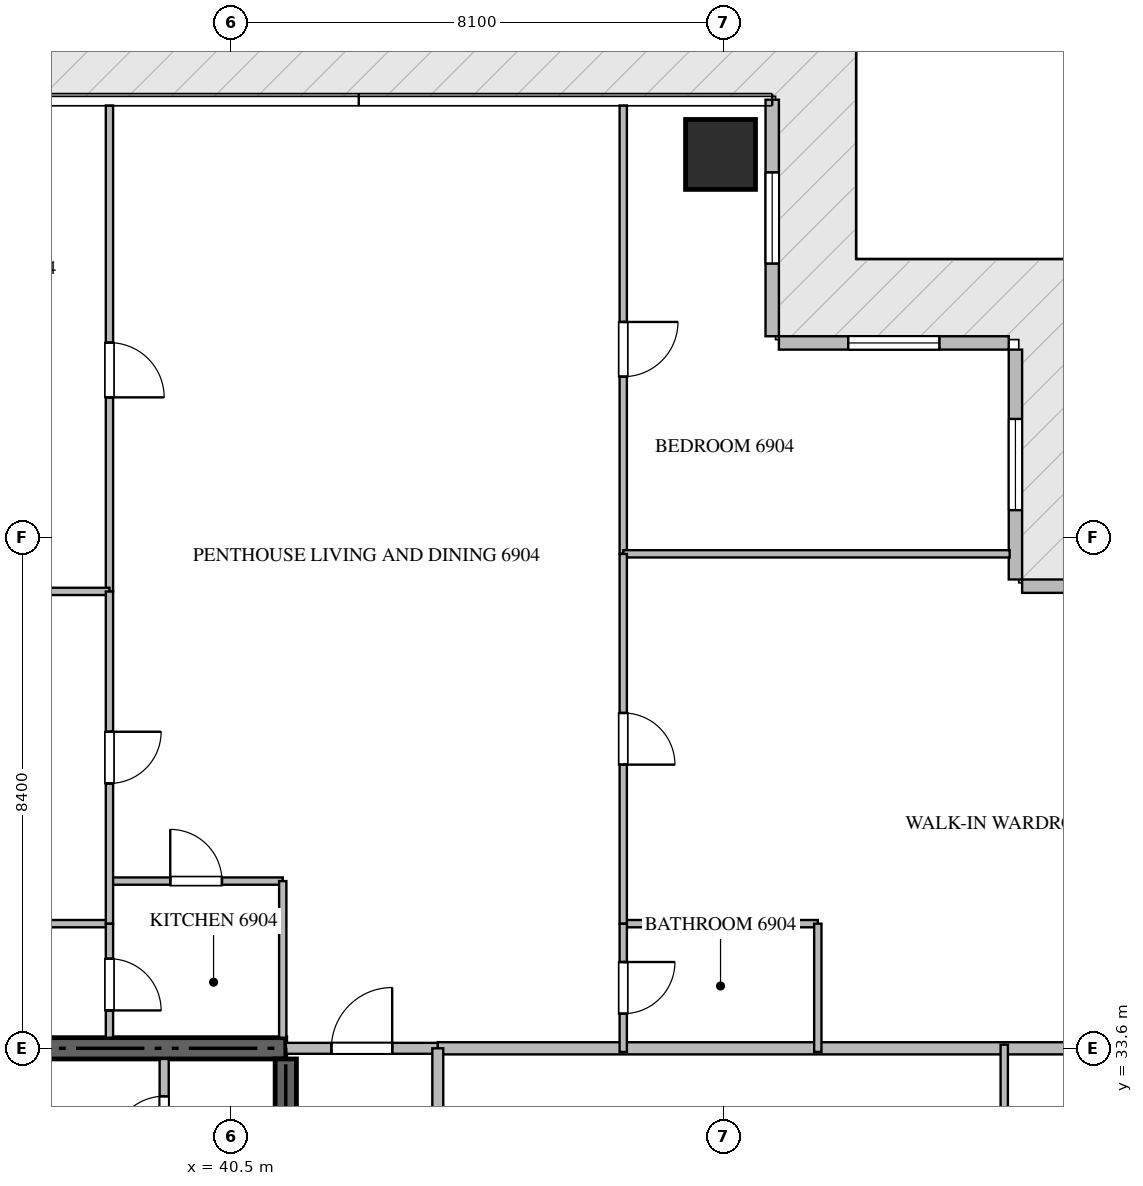
"""IFC4 building model, lengths in metres.
Left out: names, types, materials, properties, quantities, classifications, styles, units other than length and angle.
Written with IfcOpenShell. Run it as: python <this file> out.ifc"""

import sys

from ifc_helpers import new_model, si_unit, direction, frame, frame_2d, origin, origin_2d, place, context, subcontext, project, spatial, rectangle, extrude, source, transform, mapped, element, fill, save


model = new_model("IFC4")
c1 = context("Model", 3, precision=1e-05, world=origin(), true_north=direction((0.0, 1.0)))
c2 = subcontext(c1, "Body", "Model", "MODEL_VIEW")
j1 = project(units=[si_unit("LENGTHUNIT", "METRE"), si_unit("PLANEANGLEUNIT", "RADIAN")], contexts=[c1])
p1 = place(None, origin())
s1 = spatial("IfcSite", under=j1, at=p1, CompositionType="ELEMENT")
p2 = place(p1, origin())
s2 = spatial("IfcBuilding", under=s1, at=p2, CompositionType="ELEMENT")
p3 = place(p2, frame((0.0, 0.0, 275.9)))
s3 = spatial("IfcBuildingStorey", under=s2, at=p3, CompositionType="ELEMENT", Elevation=275.9)
p4 = place(p3, frame((41.4, 33.6, -0.26), z_axis=(0.0, 0.0, 1.0), x_axis=(-1.0, 0.0, 0.0)))
e1 = element("IfcWall", 1, at=p4, inside=s3, PredefinedType="SHEAR", context=c2, shape_type="SweptSolid", body=[
    extrude(rectangle(XDim=18.0, YDim=0.35, at=frame_2d((9.0, 0.0))), origin(), (0.0, 0.0, 1.0), 3.848),
])
p5 = place(p3, frame((41.4, 27.75, -0.26), z_axis=(0.0, 0.0, 1.0), x_axis=(0.0, 1.0, 0.0)))
e2 = element("IfcWall", 2, at=p5, inside=s3, PredefinedType="SHEAR", context=c2, shape_type="SweptSolid", body=[
    extrude(rectangle(XDim=5.675, YDim=0.35, at=frame_2d((2.837, 0.0))), origin(), (0.0, 0.0, 1.0), 3.848),
])
m1 = source(origin(), c2, "Body", "SweptSolid", [
    extrude(rectangle(XDim=1.15, YDim=1.15, at=origin_2d()), origin(), (0.0, 0.0, 1.0), 3.85),
])
p6 = place(p3, frame((48.55, 48.3, -0.26), z_axis=(0.0, 0.0, 1.0), x_axis=(1.0, 0.0, 0.0)))
e3 = element("IfcColumn", 3, at=p6, inside=s3, PredefinedType="COLUMN", context=c2, shape_type="MappedRepresentation", body=[
    mapped(m1, transform((0.0, 0.0, 0.0), scale=1.0)),
])
p7 = place(p3, frame((57.4, 41.2, 0.0), z_axis=(0.0, 0.0, 1.0), x_axis=(-1.0, 0.0, 0.0)))
e4 = element("IfcWall", 4, at=p7, inside=s3, PredefinedType="ELEMENTEDWALL", context=c2, shape_type="SweptSolid", body=[
    extrude(rectangle(XDim=3.89, YDim=0.22, at=frame_2d((1.945, 0.0))), origin(), (0.0, 0.0, 1.0), 3.575),
])
p8 = place(p7, frame((1.195, 0.0, 0.65)))
e5 = element("IfcOpeningElement", 5, at=p8, cuts=e4, PredefinedType="OPENING", context=c2, shape_type="SweptSolid", body=[
    extrude(rectangle(XDim=1.5, YDim=2.25, at=frame_2d((0.75, 1.125))), frame((0.0, 0.12, 0.0), z_axis=(0.0, -1.0, 0.0), x_axis=(1.0, 0.0, 0.0)), (0.0, 0.0, 1.0), 0.24),
])
p9 = place(p3, frame((53.4, 41.31, 0.0), z_axis=(0.0, 0.0, 1.0), x_axis=(0.0, 1.0, 0.0)))
e6 = element("IfcWall", 6, at=p9, inside=s3, PredefinedType="ELEMENTEDWALL", context=c2, shape_type="SweptSolid", body=[
    extrude(rectangle(XDim=3.78, YDim=0.22, at=frame_2d((1.89, 0.0))), origin(), (0.0, 0.0, 1.0), 3.575),
])
p10 = place(p9, frame((1.14, 0.0, 0.65)))
e7 = element("IfcOpeningElement", 7, at=p10, cuts=e6, PredefinedType="OPENING", context=c2, shape_type="SweptSolid", body=[
    extrude(rectangle(XDim=1.5, YDim=2.25, at=frame_2d((0.75, 1.125))), frame((0.0, 0.12, 0.0), z_axis=(0.0, -1.0, 0.0), x_axis=(1.0, 0.0, 0.0)), (0.0, 0.0, 1.0), 0.24),
])
p11 = place(p3, frame((53.29, 45.2, 0.0), z_axis=(0.0, 0.0, 1.0), x_axis=(-1.0, 0.0, 0.0)))
e8 = element("IfcWall", 8, at=p11, inside=s3, PredefinedType="ELEMENTEDWALL", context=c2, shape_type="SweptSolid", body=[
    extrude(rectangle(XDim=3.78, YDim=0.22, at=frame_2d((1.89, 0.0))), origin(), (0.0, 0.0, 1.0), 3.575),
])
p12 = place(p11, frame((1.14, 0.0, 0.65)))
e9 = element("IfcOpeningElement", 9, at=p12, cuts=e8, PredefinedType="OPENING", context=c2, shape_type="SweptSolid", body=[
    extrude(rectangle(XDim=1.5, YDim=2.25, at=frame_2d((0.75, 1.125))), frame((0.0, 0.12, 0.0), z_axis=(0.0, -1.0, 0.0), x_axis=(1.0, 0.0, 0.0)), (0.0, 0.0, 1.0), 0.24),
])
p13 = place(p3, frame((49.4, 45.31, 0.0), z_axis=(0.0, 0.0, 1.0), x_axis=(0.0, 1.0, 0.0)))
e10 = element("IfcWall", 10, at=p13, inside=s3, PredefinedType="ELEMENTEDWALL", context=c2, shape_type="SweptSolid", body=[
    extrude(rectangle(XDim=3.89, YDim=0.22, at=frame_2d((1.945, 0.0))), origin(), (0.0, 0.0, 1.0), 3.575),
])
p14 = place(p13, frame((1.195, 0.0, 0.65)))
e11 = element("IfcOpeningElement", 11, at=p14, cuts=e10, PredefinedType="OPENING", context=c2, shape_type="SweptSolid", body=[
    extrude(rectangle(XDim=1.5, YDim=2.25, at=frame_2d((0.75, 1.125))), frame((0.0, 0.12, 0.0), z_axis=(0.0, -1.0, 0.0), x_axis=(1.0, 0.0, 0.0)), (0.0, 0.0, 1.0), 0.24),
])
p15 = place(p3, frame((39.4, 31.35, 0.0), z_axis=(0.0, 0.0, 1.0), x_axis=(0.0, 1.0, 0.0)))
e12 = element("IfcWall", 12, at=p15, inside=s3, PredefinedType="PARTITIONING", context=c2, shape_type="SweptSolid", body=[
    extrude(rectangle(XDim=2.075, YDim=0.15, at=frame_2d((1.038, 0.0))), origin(), (0.0, 0.0, 1.0), 3.59),
])
p16 = place(p15, frame((0.612, 0.0, 0.0)))
e13 = element("IfcOpeningElement", 13, at=p16, cuts=e12, PredefinedType="OPENING", context=c2, shape_type="SweptSolid", body=[
    extrude(rectangle(XDim=0.85, YDim=2.1, at=frame_2d((0.425, 1.05))), frame((0.0, 0.085, 0.0), z_axis=(0.0, -1.0, 0.0), x_axis=(1.0, 0.0, 0.0)), (0.0, 0.0, 1.0), 0.17),
])
p17 = place(p3, frame((43.9, 33.6, 0.0), z_axis=(0.0, 0.0, 1.0), x_axis=(1.0, 0.0, 0.0)))
e14 = element("IfcWall", 14, at=p17, inside=s3, PredefinedType="PARTITIONING", context=c2, shape_type="SweptSolid", body=[
    extrude(rectangle(XDim=13.418, YDim=0.2, at=frame_2d((6.709, 0.0))), origin(), (0.0, 0.0, 1.0), 3.59),
])
p18 = place(p3, frame((41.402, 33.6, 0.0), z_axis=(0.0, 0.0, 1.0), x_axis=(1.0, 0.0, 0.0)))
e15 = element("IfcWall", 15, at=p18, inside=s3, PredefinedType="PARTITIONING", context=c2, shape_type="SweptSolid", body=[
    extrude(rectangle(XDim=2.496, YDim=0.18, at=frame_2d((1.248, 0.0))), origin(), (0.0, 0.0, 1.0), 3.59),
])
p19 = place(p18, frame((0.748, 0.0, 0.0)))
e16 = element("IfcOpeningElement", 16, at=p19, cuts=e15, PredefinedType="OPENING", context=c2, shape_type="SweptSolid", body=[
    extrude(rectangle(XDim=1.0, YDim=2.15, at=frame_2d((0.5, 1.075))), frame((0.0, 0.1, 0.0), z_axis=(0.0, -1.0, 0.0), x_axis=(1.0, 0.0, 0.0)), (0.0, 0.0, 1.0), 0.2),
])
p20 = place(p3, frame((43.9, 16.8, 0.0), z_axis=(0.0, 0.0, 1.0), x_axis=(0.0, 1.0, 0.0)))
e17 = element("IfcWall", 17, at=p20, inside=s3, PredefinedType="PARTITIONING", context=c2, shape_type="SweptSolid", body=[
    extrude(rectangle(XDim=16.8, YDim=0.18, at=frame_2d((8.4, 0.0))), origin(), (0.0, 0.0, 1.0), 3.59),
])
p21 = place(p20, frame((1.3, 0.0, 0.0)))
e18 = element("IfcOpeningElement", 18, at=p21, cuts=e17, PredefinedType="OPENING", context=c2, shape_type="SweptSolid", body=[
    extrude(rectangle(XDim=1.0, YDim=2.15, at=frame_2d((0.5, 1.075))), frame((0.0, 0.1, 0.0), z_axis=(0.0, -1.0, 0.0), x_axis=(1.0, 0.0, 0.0)), (0.0, 0.0, 1.0), 0.2),
])
p22 = place(p3, frame((38.5, 36.35, 0.0), z_axis=(0.0, 0.0, 1.0), x_axis=(1.0, 0.0, 0.0)))
e19 = element("IfcWall", 19, at=p22, inside=s3, PredefinedType="PARTITIONING", context=c2, shape_type="SweptSolid", body=[
    extrude(rectangle(XDim=2.85, YDim=0.12, at=frame_2d((1.425, 0.0))), origin(), (0.0, 0.0, 1.0), 3.59),
])
p23 = place(p22, frame((1.0, 0.0, 0.0)))
e20 = element("IfcOpeningElement", 20, at=p23, cuts=e19, PredefinedType="OPENING", context=c2, shape_type="SweptSolid", body=[
    extrude(rectangle(XDim=0.85, YDim=2.1, at=frame_2d((0.425, 1.05))), frame((0.0, 0.07, 0.0), z_axis=(0.0, -1.0, 0.0), x_axis=(1.0, 0.0, 0.0)), (0.0, 0.0, 1.0), 0.14),
])
p24 = place(p3, frame((41.35, 36.35, 0.0), z_axis=(0.0, 0.0, 1.0), x_axis=(0.0, -1.0, 0.0)))
e21 = element("IfcWall", 21, at=p24, inside=s3, PredefinedType="PARTITIONING", context=c2, shape_type="SweptSolid", body=[
    extrude(rectangle(XDim=2.575, YDim=0.12, at=frame_2d((1.288, 0.0))), origin(), (0.0, 0.0, 1.0), 3.59),
])
p25 = place(p3, frame((38.5, 49.105, 0.0), z_axis=(0.0, 0.0, 1.0), x_axis=(0.0, -1.0, 0.0)))
e22 = element("IfcWall", 22, at=p25, inside=s3, PredefinedType="PARTITIONING", context=c2, shape_type="SweptSolid", body=[
    extrude(rectangle(XDim=7.991, YDim=0.12, at=frame_2d((3.996, 0.0))), origin(), (0.0, 0.0, 1.0), 3.59),
])
p26 = place(p25, frame((3.9, 0.0, 0.0)))
e23 = element("IfcOpeningElement", 23, at=p26, cuts=e22, PredefinedType="OPENING", context=c2, shape_type="SweptSolid", body=[
    extrude(rectangle(XDim=0.9, YDim=2.1, at=frame_2d((0.45, 1.05))), frame((0.0, 0.07, 0.0), z_axis=(0.0, -1.0, 0.0), x_axis=(1.0, 0.0, 0.0)), (0.0, 0.0, 1.0), 0.14),
])
p27 = place(p3, frame((33.14, 41.114, 0.0), z_axis=(0.0, 0.0, 1.0), x_axis=(1.0, 0.0, 0.0)))
e24 = element("IfcWall", 24, at=p27, inside=s3, PredefinedType="PARTITIONING", context=c2, shape_type="SweptSolid", body=[
    extrude(rectangle(XDim=5.36, YDim=0.12, at=frame_2d((2.68, 0.0))), origin(), (0.0, 0.0, 1.0), 3.59),
])
p28 = place(p3, frame((33.262, 35.65, 0.0), z_axis=(0.0, 0.0, 1.0), x_axis=(1.0, 0.0, 0.0)))
e25 = element("IfcWall", 25, at=p28, inside=s3, PredefinedType="PARTITIONING", context=c2, shape_type="SweptSolid", body=[
    extrude(rectangle(XDim=5.238, YDim=0.12, at=frame_2d((2.619, 0.0))), origin(), (0.0, 0.0, 1.0), 3.59),
])
p29 = place(p3, frame((38.5, 41.112, 0.0), z_axis=(0.0, 0.0, 1.0), x_axis=(0.0, -1.0, 0.0)))
e26 = element("IfcWall", 26, at=p29, inside=s3, PredefinedType="PARTITIONING", context=c2, shape_type="SweptSolid", body=[
    extrude(rectangle(XDim=5.462, YDim=0.12, at=frame_2d((2.731, 0.0))), origin(), (0.0, 0.0, 1.0), 3.59),
])
p30 = place(p29, frame((2.306, 0.0, 0.0)))
e27 = element("IfcOpeningElement", 27, at=p30, cuts=e26, PredefinedType="OPENING", context=c2, shape_type="SweptSolid", body=[
    extrude(rectangle(XDim=0.85, YDim=2.1, at=frame_2d((0.425, 1.05))), frame((0.0, 0.07, 0.0), z_axis=(0.0, -1.0, 0.0), x_axis=(1.0, 0.0, 0.0)), (0.0, 0.0, 1.0), 0.14),
])
p31 = place(p3, frame((38.5, 35.648, 0.0), z_axis=(0.0, 0.0, 1.0), x_axis=(0.0, -1.0, 0.0)))
e28 = element("IfcWall", 28, at=p31, inside=s3, PredefinedType="PARTITIONING", context=c2, shape_type="SweptSolid", body=[
    extrude(rectangle(XDim=1.873, YDim=0.12, at=frame_2d((0.937, 0.0))), origin(), (0.0, 0.0, 1.0), 3.59),
])
p32 = place(p31, frame((0.575, 0.0, 0.0)))
e29 = element("IfcOpeningElement", 29, at=p32, cuts=e28, PredefinedType="OPENING", context=c2, shape_type="SweptSolid", body=[
    extrude(rectangle(XDim=0.85, YDim=2.1, at=frame_2d((0.425, 1.05))), frame((0.0, 0.07, 0.0), z_axis=(0.0, -1.0, 0.0), x_axis=(1.0, 0.0, 0.0)), (0.0, 0.0, 1.0), 0.14),
])
p33 = place(p3, frame((46.95, 49.105, 0.0), z_axis=(0.0, 0.0, 1.0), x_axis=(0.0, -1.0, 0.0)))
e30 = element("IfcWall", 30, at=p33, inside=s3, PredefinedType="PARTITIONING", context=c2, shape_type="SweptSolid", body=[
    extrude(rectangle(XDim=7.373, YDim=0.12, at=frame_2d((3.687, 0.0))), origin(), (0.0, 0.0, 1.0), 3.59),
])
p34 = place(p33, frame((3.56, 0.0, 0.0)))
e31 = element("IfcOpeningElement", 31, at=p34, cuts=e30, PredefinedType="OPENING", context=c2, shape_type="SweptSolid", body=[
    extrude(rectangle(XDim=0.9, YDim=2.1, at=frame_2d((0.45, 1.05))), frame((0.0, 0.07, 0.0), z_axis=(0.0, -1.0, 0.0), x_axis=(1.0, 0.0, 0.0)), (0.0, 0.0, 1.0), 0.14),
])
p35 = place(p3, frame((46.95, 41.732, 0.0), z_axis=(0.0, 0.0, 1.0), x_axis=(1.0, 0.0, 0.0)))
e32 = element("IfcWall", 32, at=p35, inside=s3, PredefinedType="PARTITIONING", context=c2, shape_type="SweptSolid", body=[
    extrude(rectangle(XDim=6.355, YDim=0.12, at=frame_2d((3.177, 0.0))), origin(), (0.0, 0.0, 1.0), 3.59),
])
p36 = place(p3, frame((46.95, 35.65, 0.0), z_axis=(0.0, 0.0, 1.0), x_axis=(1.0, 0.0, 0.0)))
e33 = element("IfcWall", 33, at=p36, inside=s3, PredefinedType="PARTITIONING", context=c2, shape_type="SweptSolid", body=[
    extrude(rectangle(XDim=3.2, YDim=0.12, at=frame_2d((1.6, 0.0))), origin(), (0.0, 0.0, 1.0), 3.59),
])
p37 = place(p3, frame((50.15, 35.65, 0.0), z_axis=(0.0, 0.0, 1.0), x_axis=(0.0, -1.0, 0.0)))
e34 = element("IfcWall", 34, at=p37, inside=s3, PredefinedType="PARTITIONING", context=c2, shape_type="SweptSolid", body=[
    extrude(rectangle(XDim=2.11, YDim=0.12, at=frame_2d((1.055, 0.0))), origin(), (0.0, 0.0, 1.0), 3.59),
])
p38 = place(p3, frame((46.95, 41.73, 0.0), z_axis=(0.0, 0.0, 1.0), x_axis=(0.0, -1.0, 0.0)))
e35 = element("IfcWall", 35, at=p38, inside=s3, PredefinedType="PARTITIONING", context=c2, shape_type="SweptSolid", body=[
    extrude(rectangle(XDim=6.08, YDim=0.12, at=frame_2d((3.04, 0.0))), origin(), (0.0, 0.0, 1.0), 3.59),
])
p39 = place(p38, frame((2.615, 0.0, 0.0)))
e36 = element("IfcOpeningElement", 36, at=p39, cuts=e35, PredefinedType="OPENING", context=c2, shape_type="SweptSolid", body=[
    extrude(rectangle(XDim=0.85, YDim=2.1, at=frame_2d((0.425, 1.05))), frame((0.0, 0.07, 0.0), z_axis=(0.0, -1.0, 0.0), x_axis=(1.0, 0.0, 0.0)), (0.0, 0.0, 1.0), 0.14),
])
p40 = place(p3, frame((46.95, 35.648, 0.0), z_axis=(0.0, 0.0, 1.0), x_axis=(0.0, -1.0, 0.0)))
e37 = element("IfcWall", 37, at=p40, inside=s3, PredefinedType="PARTITIONING", context=c2, shape_type="SweptSolid", body=[
    extrude(rectangle(XDim=2.108, YDim=0.12, at=frame_2d((1.054, 0.0))), origin(), (0.0, 0.0, 1.0), 3.59),
])
p41 = place(p40, frame((0.629, 0.0, 0.0)))
e38 = element("IfcOpeningElement", 38, at=p41, cuts=e37, PredefinedType="OPENING", context=c2, shape_type="SweptSolid", body=[
    extrude(rectangle(XDim=0.85, YDim=2.1, at=frame_2d((0.425, 1.05))), frame((0.0, 0.07, 0.0), z_axis=(0.0, -1.0, 0.0), x_axis=(1.0, 0.0, 0.0)), (0.0, 0.0, 1.0), 0.14),
])
p42 = place(p3, frame((53.216, 23.18, 0.0), z_axis=(0.0, 0.0, 1.0), x_axis=(0.0, 1.0, 0.0)))
e39 = element("IfcWall", 39, at=p42, inside=s3, PredefinedType="PARTITIONING", context=c2, shape_type="SweptSolid", body=[
    extrude(rectangle(XDim=10.48, YDim=0.12, at=frame_2d((5.24, 0.0))), origin(), (0.0, 0.0, 1.0), 3.59),
])
m2 = source(origin(), c2, "Body", "SweptSolid", [
    extrude(rectangle(XDim=1.5, YDim=2.25, at=frame_2d((0.75, 1.125))), frame((0.0, 0.03, 0.0), z_axis=(0.0, -1.0, 0.0), x_axis=(1.0, 0.0, 0.0)), (0.0, 0.0, 1.0), 0.06),
])
p43 = place(p10, origin())
e40 = element("IfcWindow", 40, at=p43, inside=s3, PartitioningType="SINGLE_PANEL", PredefinedType="WINDOW", context=c2, shape_type="MappedRepresentation", body=[
    mapped(m2, transform((0.0, 0.0, 0.0), scale=1.0)),
])
fill(e7, e40)
p44 = place(p12, origin())
e41 = element("IfcWindow", 41, at=p44, inside=s3, PartitioningType="SINGLE_PANEL", PredefinedType="WINDOW", context=c2, shape_type="MappedRepresentation", body=[
    mapped(m2, transform((0.0, 0.0, 0.0), scale=1.0)),
])
fill(e9, e41)
p45 = place(p14, origin())
e42 = element("IfcWindow", 42, at=p45, inside=s3, PartitioningType="SINGLE_PANEL", PredefinedType="WINDOW", context=c2, shape_type="MappedRepresentation", body=[
    mapped(m2, transform((0.0, 0.0, 0.0), scale=1.0)),
])
fill(e11, e42)
m3 = source(origin(), c2, "Body", "SweptSolid", [
    extrude(rectangle(XDim=0.85, YDim=2.1, at=frame_2d((0.425, 1.05))), frame((0.0, 0.025, 0.0), z_axis=(0.0, -1.0, 0.0), x_axis=(1.0, 0.0, 0.0)), (0.0, 0.0, 1.0), 0.05),
])
p46 = place(p16, origin())
e43 = element("IfcDoor", 43, at=p46, inside=s3, OperationType="SINGLE_SWING_LEFT", PredefinedType="DOOR", context=c2, shape_type="MappedRepresentation", body=[
    mapped(m3, transform((0.0, 0.0, 0.0), scale=1.0)),
])
fill(e13, e43)
m4 = source(origin(), c2, "Body", "SweptSolid", [
    extrude(rectangle(XDim=1.0, YDim=2.15, at=frame_2d((0.5, 1.075))), frame((0.0, 0.025, 0.0), z_axis=(0.0, -1.0, 0.0), x_axis=(1.0, 0.0, 0.0)), (0.0, 0.0, 1.0), 0.05),
])
p47 = place(p19, origin())
e44 = element("IfcDoor", 44, at=p47, inside=s3, OperationType="SINGLE_SWING_RIGHT", PredefinedType="DOOR", context=c2, shape_type="MappedRepresentation", body=[
    mapped(m4, transform((0.0, 0.0, 0.0), scale=1.0)),
])
fill(e16, e44)
p48 = place(p23, origin())
e45 = element("IfcDoor", 45, at=p48, inside=s3, OperationType="SINGLE_SWING_LEFT", PredefinedType="DOOR", context=c2, shape_type="MappedRepresentation", body=[
    mapped(m3, transform((0.0, 0.0, 0.0), scale=1.0)),
])
fill(e20, e45)
m5 = source(origin(), c2, "Body", "SweptSolid", [
    extrude(rectangle(XDim=0.9, YDim=2.1, at=frame_2d((0.45, 1.05))), frame((0.0, 0.025, 0.0), z_axis=(0.0, -1.0, 0.0), x_axis=(1.0, 0.0, 0.0)), (0.0, 0.0, 1.0), 0.05),
])
p49 = place(p26, origin())
e46 = element("IfcDoor", 46, at=p49, inside=s3, OperationType="SINGLE_SWING_RIGHT", PredefinedType="DOOR", context=c2, shape_type="MappedRepresentation", body=[
    mapped(m5, transform((0.0, 0.0, 0.0), scale=1.0)),
])
fill(e23, e46)
p50 = place(p30, origin())
e47 = element("IfcDoor", 47, at=p50, inside=s3, OperationType="SINGLE_SWING_LEFT", PredefinedType="DOOR", context=c2, shape_type="MappedRepresentation", body=[
    mapped(m3, transform((0.0, 0.0, 0.0), scale=1.0)),
])
fill(e27, e47)
p51 = place(p32, origin())
e48 = element("IfcDoor", 48, at=p51, inside=s3, OperationType="SINGLE_SWING_RIGHT", PredefinedType="DOOR", context=c2, shape_type="MappedRepresentation", body=[
    mapped(m3, transform((0.0, 0.0, 0.0), scale=1.0)),
])
fill(e29, e48)
p52 = place(p34, origin())
e49 = element("IfcDoor", 49, at=p52, inside=s3, OperationType="SINGLE_SWING_LEFT", PredefinedType="DOOR", context=c2, shape_type="MappedRepresentation", body=[
    mapped(m5, transform((0.0, 0.0, 0.0), scale=1.0)),
])
fill(e31, e49)
p53 = place(p39, origin())
e50 = element("IfcDoor", 50, at=p53, inside=s3, OperationType="SINGLE_SWING_RIGHT", PredefinedType="DOOR", context=c2, shape_type="MappedRepresentation", body=[
    mapped(m3, transform((0.0, 0.0, 0.0), scale=1.0)),
])
fill(e36, e50)
p54 = place(p41, origin())
e51 = element("IfcDoor", 51, at=p54, inside=s3, OperationType="SINGLE_SWING_LEFT", PredefinedType="DOOR", context=c2, shape_type="MappedRepresentation", body=[
    mapped(m3, transform((0.0, 0.0, 0.0), scale=1.0)),
])
fill(e38, e51)
save(model, sys.argv[1])
